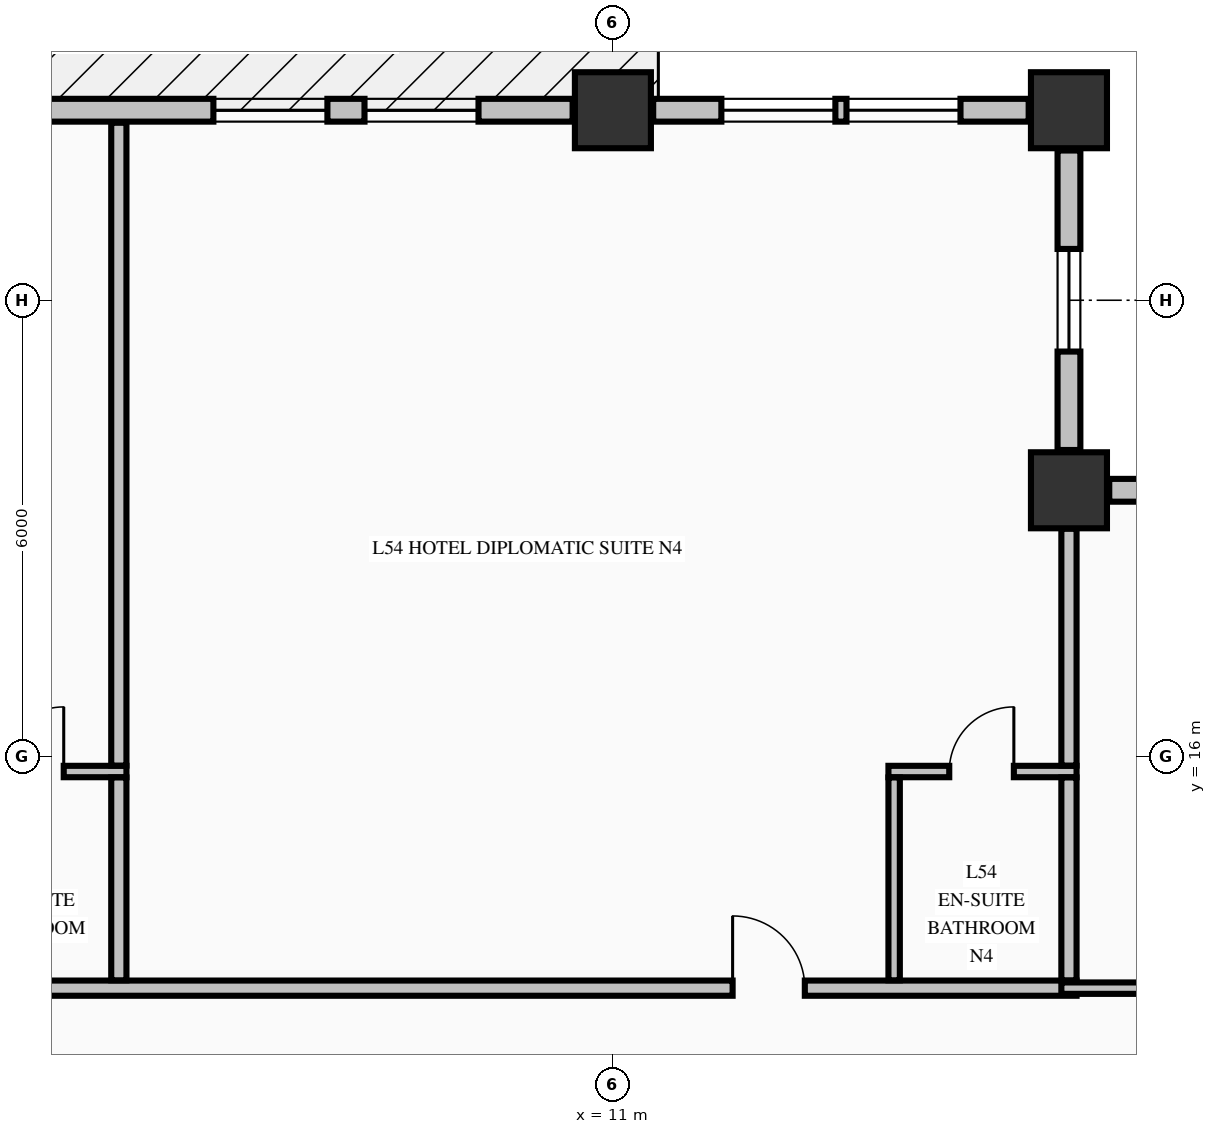
"""IFC4 building model, lengths in metres.
Left out: names, types, materials, properties, quantities, classifications, styles, units other than length and angle.
Written with IfcOpenShell. Run it as: python <this file> out.ifc"""

import sys

from ifc_helpers import new_model, si_unit, direction, frame, frame_2d, origin, origin_2d, place, context, subcontext, project, spatial, rectangle, extrude, element, fill, save


model = new_model("IFC4")
c1 = context("Model", 3, precision=1e-05, world=origin(), true_north=direction((0.0, 1.0)))
c2 = subcontext(c1, "Body", "Model", "MODEL_VIEW")
j1 = project(units=[si_unit("LENGTHUNIT", "METRE"), si_unit("PLANEANGLEUNIT", "RADIAN")], contexts=[c1])
p1 = place(None, origin())
s1 = spatial("IfcSite", under=j1, at=p1, CompositionType="ELEMENT")
p2 = place(p1, origin())
s2 = spatial("IfcBuilding", under=s1, at=p2, CompositionType="ELEMENT")
p3 = place(p2, frame((0.0, 0.0, 208.46)))
s3 = spatial("IfcBuildingStorey", under=s2, at=p3, CompositionType="ELEMENT", Elevation=208.46)
for number, where, z_axis, x_axis in (
    (1, (11.0, 24.5, -0.25), (0.0, 0.0, 1.0), (1.0, 0.0, 0.0)),
    (2, (17.0, 24.5, -0.25), (0.0, 0.0, 1.0), (1.0, 0.0, 0.0)),
    (3, (17.0, 19.5, -0.25), (0.0, 0.0, 1.0), (1.0, 0.0, 0.0)),
):
    element("IfcColumn", number, at=place(p3, frame(where, z_axis=z_axis, x_axis=x_axis)), inside=s3, PredefinedType="COLUMN", context=c2, shape_type="SweptSolid", body=[
        extrude(rectangle(XDim=1.0, YDim=1.0, at=origin_2d()), origin(), (0.0, 0.0, 1.0), 3.325),
    ])
p4 = place(p3, frame((21.47, 19.5, 0.0), z_axis=(0.0, 0.0, 1.0), x_axis=(-1.0, 0.0, 0.0)))
e4 = element("IfcWall", 4, at=p4, inside=s3, PredefinedType="STANDARD", context=c2, shape_type="SweptSolid", body=[
    extrude(rectangle(XDim=3.94, YDim=0.3, at=frame_2d((1.97, 0.0))), origin(), (0.0, 0.0, 1.0), 2.467),
])
p5 = place(p4, frame((1.295, 0.0, 0.68)))
e5 = element("IfcOpeningElement", 5, at=p5, cuts=e4, PredefinedType="OPENING", context=c2, shape_type="SweptSolid", body=[
    extrude(rectangle(XDim=1.35, YDim=1.42, at=frame_2d((0.675, 0.71))), frame((0.0, 0.16, 0.0), z_axis=(0.0, -1.0, 0.0), x_axis=(1.0, 0.0, 0.0)), (0.0, 0.0, 1.0), 0.32),
])
p6 = place(p3, frame((17.0, 20.03, 0.0), z_axis=(0.0, 0.0, 1.0), x_axis=(0.0, 1.0, 0.0)))
e6 = element("IfcWall", 6, at=p6, inside=s3, PredefinedType="STANDARD", context=c2, shape_type="SweptSolid", body=[
    extrude(rectangle(XDim=3.94, YDim=0.3, at=frame_2d((1.97, 0.0))), origin(), (0.0, 0.0, 1.0), 2.467),
])
p7 = place(p6, frame((1.295, 0.0, 0.68)))
e7 = element("IfcOpeningElement", 7, at=p7, cuts=e6, PredefinedType="OPENING", context=c2, shape_type="SweptSolid", body=[
    extrude(rectangle(XDim=1.35, YDim=1.42, at=frame_2d((0.675, 0.71))), frame((0.0, 0.16, 0.0), z_axis=(0.0, -1.0, 0.0), x_axis=(1.0, 0.0, 0.0)), (0.0, 0.0, 1.0), 0.32),
])
p8 = place(p3, frame((10.47, 24.5, 0.0), z_axis=(0.0, 0.0, 1.0), x_axis=(-1.0, 0.0, 0.0)))
e8 = element("IfcWall", 8, at=p8, inside=s3, PredefinedType="STANDARD", context=c2, shape_type="SweptSolid", body=[
    extrude(rectangle(XDim=9.94, YDim=0.3, at=frame_2d((4.97, 0.0))), origin(), (0.0, 0.0, 1.0), 2.467),
])
p9 = place(p8, frame((1.238, 0.0, 0.72)))
e9 = element("IfcOpeningElement", 9, at=p9, cuts=e8, PredefinedType="OPENING", context=c2, shape_type="SweptSolid", body=[
    extrude(rectangle(XDim=1.5, YDim=1.6, at=frame_2d((0.75, 0.8))), frame((0.0, 0.16, 0.0), z_axis=(0.0, -1.0, 0.0), x_axis=(1.0, 0.0, 0.0)), (0.0, 0.0, 1.0), 0.32),
])
p10 = place(p8, frame((3.226, 0.0, 0.72)))
e10 = element("IfcOpeningElement", 10, at=p10, cuts=e8, PredefinedType="OPENING", context=c2, shape_type="SweptSolid", body=[
    extrude(rectangle(XDim=1.5, YDim=1.6, at=frame_2d((0.75, 0.8))), frame((0.0, 0.16, 0.0), z_axis=(0.0, -1.0, 0.0), x_axis=(1.0, 0.0, 0.0)), (0.0, 0.0, 1.0), 0.32),
])
p11 = place(p8, frame((7.202, 0.0, 0.72)))
e11 = element("IfcOpeningElement", 11, at=p11, cuts=e8, PredefinedType="OPENING", context=c2, shape_type="SweptSolid", body=[
    extrude(rectangle(XDim=1.5, YDim=1.6, at=frame_2d((0.75, 0.8))), frame((0.0, 0.16, 0.0), z_axis=(0.0, -1.0, 0.0), x_axis=(1.0, 0.0, 0.0)), (0.0, 0.0, 1.0), 0.32),
])
p12 = place(p3, frame((16.47, 24.5, 0.0), z_axis=(0.0, 0.0, 1.0), x_axis=(-1.0, 0.0, 0.0)))
e12 = element("IfcWall", 12, at=p12, inside=s3, PredefinedType="STANDARD", context=c2, shape_type="SweptSolid", body=[
    extrude(rectangle(XDim=4.94, YDim=0.3, at=frame_2d((2.47, 0.0))), origin(), (0.0, 0.0, 1.0), 2.467),
])
p13 = place(p12, frame((0.897, 0.0, 0.72)))
e13 = element("IfcOpeningElement", 13, at=p13, cuts=e12, PredefinedType="OPENING", context=c2, shape_type="SweptSolid", body=[
    extrude(rectangle(XDim=1.5, YDim=1.6, at=frame_2d((0.75, 0.8))), frame((0.0, 0.16, 0.0), z_axis=(0.0, -1.0, 0.0), x_axis=(1.0, 0.0, 0.0)), (0.0, 0.0, 1.0), 0.32),
])
p14 = place(p12, frame((2.543, 0.0, 0.72)))
e14 = element("IfcOpeningElement", 14, at=p14, cuts=e12, PredefinedType="OPENING", context=c2, shape_type="SweptSolid", body=[
    extrude(rectangle(XDim=1.5, YDim=1.6, at=frame_2d((0.75, 0.8))), frame((0.0, 0.16, 0.0), z_axis=(0.0, -1.0, 0.0), x_axis=(1.0, 0.0, 0.0)), (0.0, 0.0, 1.0), 0.32),
])
p15 = place(p3, frame((-22.1, 12.95, 0.0), z_axis=(0.0, 0.0, 1.0), x_axis=(1.0, 0.0, 0.0)))
e15 = element("IfcWall", 15, at=p15, inside=s3, PredefinedType="PARTITIONING", context=c2, shape_type="SweptSolid", body=[
    extrude(rectangle(XDim=39.2, YDim=0.2, at=frame_2d((19.6, 0.0))), origin(), (0.0, 0.0, 1.0), 3.075),
])
p16 = place(p15, frame((4.525, 0.0, 0.0)))
e16 = element("IfcOpeningElement", 16, at=p16, cuts=e15, PredefinedType="OPENING", context=c2, shape_type="SweptSolid", body=[
    extrude(rectangle(XDim=0.95, YDim=2.15, at=frame_2d((0.475, 1.075))), frame((0.0, 0.11, 0.0), z_axis=(0.0, -1.0, 0.0), x_axis=(1.0, 0.0, 0.0)), (0.0, 0.0, 1.0), 0.22),
])
p17 = place(p15, frame((12.475, 0.0, 0.0)))
e17 = element("IfcOpeningElement", 17, at=p17, cuts=e15, PredefinedType="OPENING", context=c2, shape_type="SweptSolid", body=[
    extrude(rectangle(XDim=0.95, YDim=2.15, at=frame_2d((0.475, 1.075))), frame((0.0, 0.11, 0.0), z_axis=(0.0, -1.0, 0.0), x_axis=(1.0, 0.0, 0.0)), (0.0, 0.0, 1.0), 0.22),
])
p18 = place(p15, frame((22.175, 0.0, 0.0)))
e18 = element("IfcOpeningElement", 18, at=p18, cuts=e15, PredefinedType="OPENING", context=c2, shape_type="SweptSolid", body=[
    extrude(rectangle(XDim=0.95, YDim=2.15, at=frame_2d((0.475, 1.075))), frame((0.0, 0.11, 0.0), z_axis=(0.0, -1.0, 0.0), x_axis=(1.0, 0.0, 0.0)), (0.0, 0.0, 1.0), 0.22),
])
p19 = place(p15, frame((34.675, 0.0, 0.0)))
e19 = element("IfcOpeningElement", 19, at=p19, cuts=e15, PredefinedType="OPENING", context=c2, shape_type="SweptSolid", body=[
    extrude(rectangle(XDim=0.95, YDim=2.15, at=frame_2d((0.475, 1.075))), frame((0.0, 0.11, 0.0), z_axis=(0.0, -1.0, 0.0), x_axis=(1.0, 0.0, 0.0)), (0.0, 0.0, 1.0), 0.22),
])
p20 = place(p3, frame((16.9, 12.95, 0.0), z_axis=(0.0, 0.0, 1.0), x_axis=(1.0, 0.0, 0.0)))
e20 = element("IfcWall", 20, at=p20, inside=s3, PredefinedType="PARTITIONING", context=c2, shape_type="SweptSolid", body=[
    extrude(rectangle(XDim=3.175, YDim=0.15, at=frame_2d((1.587, 0.0))), origin(), (0.0, 0.0, 1.0), 3.075),
])
p21 = place(p3, frame((2.125, 15.8, 0.0), z_axis=(0.0, 0.0, 1.0), x_axis=(1.0, 0.0, 0.0)))
e21 = element("IfcWall", 21, at=p21, inside=s3, PredefinedType="PARTITIONING", context=c2, shape_type="SweptSolid", body=[
    extrude(rectangle(XDim=2.475, YDim=0.15, at=frame_2d((1.238, 0.0))), origin(), (0.0, 0.0, 1.0), 3.075),
])
p22 = place(p21, frame((0.8, 0.0, 0.0)))
e22 = element("IfcOpeningElement", 22, at=p22, cuts=e21, PredefinedType="OPENING", context=c2, shape_type="SweptSolid", body=[
    extrude(rectangle(XDim=0.85, YDim=2.1, at=frame_2d((0.425, 1.05))), frame((0.0, 0.085, 0.0), z_axis=(0.0, -1.0, 0.0), x_axis=(1.0, 0.0, 0.0)), (0.0, 0.0, 1.0), 0.17),
])
p23 = place(p3, frame((14.625, 15.8, 0.0), z_axis=(0.0, 0.0, 1.0), x_axis=(1.0, 0.0, 0.0)))
e23 = element("IfcWall", 23, at=p23, inside=s3, PredefinedType="PARTITIONING", context=c2, shape_type="SweptSolid", body=[
    extrude(rectangle(XDim=2.475, YDim=0.15, at=frame_2d((1.238, 0.0))), origin(), (0.0, 0.0, 1.0), 3.075),
])
p24 = place(p23, frame((0.8, 0.0, 0.0)))
e24 = element("IfcOpeningElement", 24, at=p24, cuts=e23, PredefinedType="OPENING", context=c2, shape_type="SweptSolid", body=[
    extrude(rectangle(XDim=0.85, YDim=2.1, at=frame_2d((0.425, 1.05))), frame((0.0, 0.085, 0.0), z_axis=(0.0, -1.0, 0.0), x_axis=(1.0, 0.0, 0.0)), (0.0, 0.0, 1.0), 0.17),
])
p25 = place(p3, frame((4.5, 13.053, 0.0), z_axis=(0.0, 0.0, 1.0), x_axis=(0.0, 1.0, 0.0)))
e25 = element("IfcWall", 25, at=p25, inside=s3, PredefinedType="PARTITIONING", context=c2, shape_type="SweptSolid", body=[
    extrude(rectangle(XDim=2.669, YDim=0.2, at=frame_2d((1.334, 0.0))), origin(), (0.0, 0.0, 1.0), 3.075),
])
p26 = place(p3, frame((4.5, 15.878, 0.0), z_axis=(0.0, 0.0, 1.0), x_axis=(0.0, 1.0, 0.0)))
e26 = element("IfcWall", 26, at=p26, inside=s3, PredefinedType="PARTITIONING", context=c2, shape_type="SweptSolid", body=[
    extrude(rectangle(XDim=8.457, YDim=0.2, at=frame_2d((4.229, 0.0))), origin(), (0.0, 0.0, 1.0), 3.075),
])
p27 = place(p3, frame((14.7, 13.053, 0.0), z_axis=(0.0, 0.0, 1.0), x_axis=(0.0, 1.0, 0.0)))
e27 = element("IfcWall", 27, at=p27, inside=s3, PredefinedType="PARTITIONING", context=c2, shape_type="SweptSolid", body=[
    extrude(rectangle(XDim=2.669, YDim=0.15, at=frame_2d((1.334, 0.0))), origin(), (0.0, 0.0, 1.0), 3.075),
])
p28 = place(p3, frame((17.0, 13.053, 0.0), z_axis=(0.0, 0.0, 1.0), x_axis=(0.0, 1.0, 0.0)))
e28 = element("IfcWall", 28, at=p28, inside=s3, PredefinedType="PARTITIONING", context=c2, shape_type="SweptSolid", body=[
    extrude(rectangle(XDim=2.669, YDim=0.2, at=frame_2d((1.334, 0.0))), origin(), (0.0, 0.0, 1.0), 3.075),
])
p29 = place(p3, frame((17.0, 15.878, 0.0), z_axis=(0.0, 0.0, 1.0), x_axis=(0.0, 1.0, 0.0)))
e29 = element("IfcWall", 29, at=p29, inside=s3, PredefinedType="PARTITIONING", context=c2, shape_type="SweptSolid", body=[
    extrude(rectangle(XDim=3.116, YDim=0.2, at=frame_2d((1.558, 0.0))), origin(), (0.0, 0.0, 1.0), 3.075),
])
p30 = place(p7, origin())
e30 = element("IfcWindow", 30, at=p30, inside=s3, PartitioningType="SINGLE_PANEL", PredefinedType="WINDOW", context=c2, shape_type="SweptSolid", body=[
    extrude(rectangle(XDim=1.35, YDim=1.42, at=frame_2d((0.675, 0.71))), frame((0.0, 0.03, 0.0), z_axis=(0.0, -1.0, 0.0), x_axis=(1.0, 0.0, 0.0)), (0.0, 0.0, 1.0), 0.06),
])
fill(e7, e30)
p31 = place(p9, origin())
e31 = element("IfcWindow", 31, at=p31, inside=s3, PartitioningType="SINGLE_PANEL", PredefinedType="WINDOW", context=c2, shape_type="SweptSolid", body=[
    extrude(rectangle(XDim=1.5, YDim=1.6, at=frame_2d((0.75, 0.8))), frame((0.0, 0.03, 0.0), z_axis=(0.0, -1.0, 0.0), x_axis=(1.0, 0.0, 0.0)), (0.0, 0.0, 1.0), 0.06),
])
fill(e9, e31)
p32 = place(p10, origin())
e32 = element("IfcWindow", 32, at=p32, inside=s3, PartitioningType="SINGLE_PANEL", PredefinedType="WINDOW", context=c2, shape_type="SweptSolid", body=[
    extrude(rectangle(XDim=1.5, YDim=1.6, at=frame_2d((0.75, 0.8))), frame((0.0, 0.03, 0.0), z_axis=(0.0, -1.0, 0.0), x_axis=(1.0, 0.0, 0.0)), (0.0, 0.0, 1.0), 0.06),
])
fill(e10, e32)
p33 = place(p13, origin())
e33 = element("IfcWindow", 33, at=p33, inside=s3, PartitioningType="SINGLE_PANEL", PredefinedType="WINDOW", context=c2, shape_type="SweptSolid", body=[
    extrude(rectangle(XDim=1.5, YDim=1.6, at=frame_2d((0.75, 0.8))), frame((0.0, 0.03, 0.0), z_axis=(0.0, -1.0, 0.0), x_axis=(1.0, 0.0, 0.0)), (0.0, 0.0, 1.0), 0.06),
])
fill(e13, e33)
p34 = place(p14, origin())
e34 = element("IfcWindow", 34, at=p34, inside=s3, PartitioningType="SINGLE_PANEL", PredefinedType="WINDOW", context=c2, shape_type="SweptSolid", body=[
    extrude(rectangle(XDim=1.5, YDim=1.6, at=frame_2d((0.75, 0.8))), frame((0.0, 0.03, 0.0), z_axis=(0.0, -1.0, 0.0), x_axis=(1.0, 0.0, 0.0)), (0.0, 0.0, 1.0), 0.06),
])
fill(e14, e34)
p35 = place(p22, origin())
e35 = element("IfcDoor", 35, at=p35, inside=s3, OperationType="SINGLE_SWING_RIGHT", PredefinedType="DOOR", context=c2, shape_type="SweptSolid", body=[
    extrude(rectangle(XDim=0.85, YDim=2.1, at=frame_2d((0.425, 1.05))), frame((0.0, 0.025, 0.0), z_axis=(0.0, -1.0, 0.0), x_axis=(1.0, 0.0, 0.0)), (0.0, 0.0, 1.0), 0.05),
])
fill(e22, e35)
p36 = place(p19, origin())
e36 = element("IfcDoor", 36, at=p36, inside=s3, OperationType="SINGLE_SWING_LEFT", PredefinedType="DOOR", context=c2, shape_type="SweptSolid", body=[
    extrude(rectangle(XDim=0.95, YDim=2.15, at=frame_2d((0.475, 1.075))), frame((0.0, 0.025, 0.0), z_axis=(0.0, -1.0, 0.0), x_axis=(1.0, 0.0, 0.0)), (0.0, 0.0, 1.0), 0.05),
])
fill(e19, e36)
p37 = place(p24, origin())
e37 = element("IfcDoor", 37, at=p37, inside=s3, OperationType="SINGLE_SWING_RIGHT", PredefinedType="DOOR", context=c2, shape_type="SweptSolid", body=[
    extrude(rectangle(XDim=0.85, YDim=2.1, at=frame_2d((0.425, 1.05))), frame((0.0, 0.025, 0.0), z_axis=(0.0, -1.0, 0.0), x_axis=(1.0, 0.0, 0.0)), (0.0, 0.0, 1.0), 0.05),
])
fill(e24, e37)
save(model, sys.argv[1])
